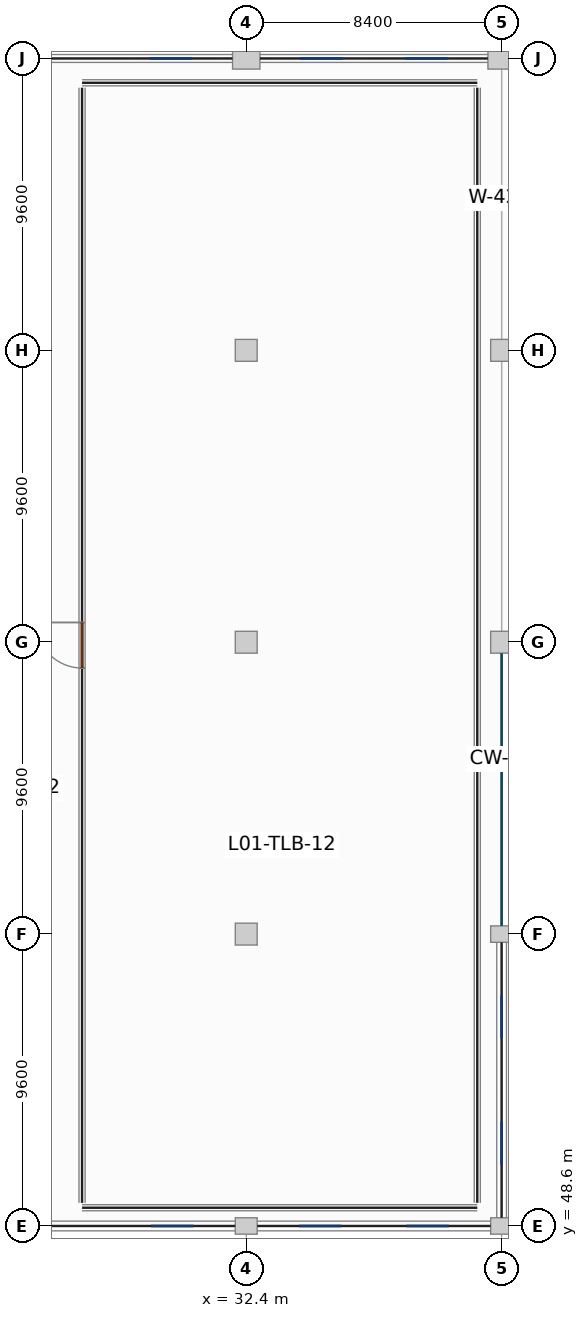
"""IFC4 building model, lengths in metres.
Left out: names, types, materials, properties, quantities, classifications, styles, units other than length and angle.
Written with IfcOpenShell. Run it as: python <this file> out.ifc"""

import sys

from ifc_helpers import new_model, si_unit, direction, frame, frame_2d, origin, origin_2d, place, context, subcontext, project, spatial, rectangle, extrude, element, fill, save


model = new_model("IFC4")
c1 = context("Model", 3, precision=1e-05, world=origin(), true_north=direction((0.0, 1.0)))
c2 = subcontext(c1, "Body", "Model", "MODEL_VIEW")
j1 = project(units=[si_unit("LENGTHUNIT", "METRE"), si_unit("PLANEANGLEUNIT", "RADIAN")], contexts=[c1])
p1 = place(None, origin())
s1 = spatial("IfcSite", under=j1, at=p1, CompositionType="ELEMENT")
p2 = place(p1, origin())
s2 = spatial("IfcBuilding", under=s1, at=p2, CompositionType="ELEMENT")
p3 = place(p2, frame((0.0, 0.0, 5.4)))
s3 = spatial("IfcBuildingStorey", under=s2, at=p3, CompositionType="ELEMENT", Elevation=5.4)
p4 = place(p3, frame((32.4, 48.6, 0.0), z_axis=(0.0, 0.0, 1.0), x_axis=(1.0, 0.0, 0.0)))
e1 = element("IfcColumn", 1, at=p4, inside=s3, PredefinedType="COLUMN", context=c2, shape_type="SweptSolid", body=[
    extrude(rectangle(XDim=0.72, YDim=0.54, at=origin_2d()), origin(), (0.0, 0.0, 1.0), 4.18),
])
for number, where, z_axis, x_axis in (
    (2, (32.4, 58.2, 0.0), (0.0, 0.0, 1.0), (1.0, 0.0, 0.0)),
    (3, (32.4, 67.8, 0.0), (0.0, 0.0, 1.0), (1.0, 0.0, 0.0)),
    (4, (32.4, 77.4, 0.0), (0.0, 0.0, 1.0), (1.0, 0.0, 0.0)),
):
    element("IfcColumn", number, at=place(p3, frame(where, z_axis=z_axis, x_axis=x_axis)), inside=s3, PredefinedType="COLUMN", context=c2, shape_type="SweptSolid", body=[
        extrude(rectangle(XDim=0.72, YDim=0.72, at=origin_2d()), origin(), (0.0, 0.0, 1.0), 4.18),
    ])
p5 = place(p3, frame((32.4, 87.0, 0.0), z_axis=(0.0, 0.0, 1.0), x_axis=(1.0, 0.0, 0.0)))
e5 = element("IfcColumn", 5, at=p5, inside=s3, PredefinedType="COLUMN", context=c2, shape_type="SweptSolid", body=[
    extrude(rectangle(XDim=0.9, YDim=0.7, at=origin_2d()), origin(), (0.0, 0.0, 1.0), 4.18),
])
for number, where, z_axis, x_axis in (
    (6, (40.8, 48.6, 0.0), (0.0, 0.0, 1.0), (1.0, 0.0, 0.0)),
    (7, (40.8, 58.2, 0.0), (0.0, 0.0, 1.0), (1.0, 0.0, 0.0)),
):
    element("IfcColumn", number, at=place(p3, frame(where, z_axis=z_axis, x_axis=x_axis)), inside=s3, PredefinedType="COLUMN", context=c2, shape_type="SweptSolid", body=[
        extrude(rectangle(XDim=0.72, YDim=0.54, at=origin_2d()), origin(), (0.0, 0.0, 1.0), 4.18),
    ])
for number, where, z_axis, x_axis in (
    (8, (40.8, 67.8, 0.0), (0.0, 0.0, 1.0), (1.0, 0.0, 0.0)),
    (9, (40.8, 77.4, 0.0), (0.0, 0.0, 1.0), (1.0, 0.0, 0.0)),
):
    element("IfcColumn", number, at=place(p3, frame(where, z_axis=z_axis, x_axis=x_axis)), inside=s3, PredefinedType="COLUMN", context=c2, shape_type="SweptSolid", body=[
        extrude(rectangle(XDim=0.72, YDim=0.72, at=origin_2d()), origin(), (0.0, 0.0, 1.0), 4.18),
    ])
p6 = place(p3, frame((40.8, 87.0, 0.0), z_axis=(0.0, 0.0, 1.0), x_axis=(1.0, 0.0, 0.0)))
e10 = element("IfcColumn", 10, at=p6, inside=s3, PredefinedType="COLUMN", context=c2, shape_type="SweptSolid", body=[
    extrude(rectangle(XDim=0.9, YDim=0.7, at=origin_2d()), origin(), (0.0, 0.0, 1.0), 4.18),
])
p7 = place(p3, frame((40.8, 48.872, 0.0), z_axis=(0.0, 0.0, 1.0), x_axis=(0.0, 1.0, 0.0)))
e11 = element("IfcWall", 11, at=p7, inside=s3, PredefinedType="SOLIDWALL", context=c2, shape_type="SweptSolid", body=[
    extrude(rectangle(XDim=9.056, YDim=0.32, at=frame_2d((4.528, 0.0))), origin(), (0.0, 0.0, 1.0), 3.38),
])
p8 = place(p7, frame((1.745, 0.0, 0.85)))
e12 = element("IfcOpeningElement", 12, at=p8, cuts=e11, PredefinedType="OPENING", context=c2, shape_type="SweptSolid", body=[
    extrude(rectangle(XDim=1.4, YDim=1.65, at=frame_2d((0.7, 0.825))), frame((0.0, 0.17, 0.0), z_axis=(0.0, -1.0, 0.0), x_axis=(1.0, 0.0, 0.0)), (0.0, 0.0, 1.0), 0.34),
])
p9 = place(p7, frame((5.911, 0.0, 0.85)))
e13 = element("IfcOpeningElement", 13, at=p9, cuts=e11, PredefinedType="OPENING", context=c2, shape_type="SweptSolid", body=[
    extrude(rectangle(XDim=1.4, YDim=1.65, at=frame_2d((0.7, 0.825))), frame((0.0, 0.17, 0.0), z_axis=(0.0, -1.0, 0.0), x_axis=(1.0, 0.0, 0.0)), (0.0, 0.0, 1.0), 0.34),
])
p10 = place(p3, frame((24.362, 48.6, 0.0), z_axis=(0.0, 0.0, 1.0), x_axis=(1.0, 0.0, 0.0)))
e14 = element("IfcWall", 14, at=p10, inside=s3, PredefinedType="SOLIDWALL", context=c2, shape_type="SweptSolid", body=[
    extrude(rectangle(XDim=7.676, YDim=0.32, at=frame_2d((3.838, 0.0))), origin(), (0.0, 0.0, 1.0), 3.38),
])
p11 = place(p10, frame((4.904, 0.0, 0.85)))
e15 = element("IfcOpeningElement", 15, at=p11, cuts=e14, PredefinedType="OPENING", context=c2, shape_type="SweptSolid", body=[
    extrude(rectangle(XDim=1.4, YDim=1.65, at=frame_2d((0.7, 0.825))), frame((0.0, 0.17, 0.0), z_axis=(0.0, -1.0, 0.0), x_axis=(1.0, 0.0, 0.0)), (0.0, 0.0, 1.0), 0.34),
])
p12 = place(p3, frame((32.762, 48.6, 0.0), z_axis=(0.0, 0.0, 1.0), x_axis=(1.0, 0.0, 0.0)))
e16 = element("IfcWall", 16, at=p12, inside=s3, PredefinedType="SOLIDWALL", context=c2, shape_type="SweptSolid", body=[
    extrude(rectangle(XDim=7.676, YDim=0.32, at=frame_2d((3.838, 0.0))), origin(), (0.0, 0.0, 1.0), 3.38),
])
p13 = place(p12, frame((1.373, 0.0, 0.85)))
e17 = element("IfcOpeningElement", 17, at=p13, cuts=e16, PredefinedType="OPENING", context=c2, shape_type="SweptSolid", body=[
    extrude(rectangle(XDim=1.4, YDim=1.65, at=frame_2d((0.7, 0.825))), frame((0.0, 0.17, 0.0), z_axis=(0.0, -1.0, 0.0), x_axis=(1.0, 0.0, 0.0)), (0.0, 0.0, 1.0), 0.34),
])
p14 = place(p12, frame((4.904, 0.0, 0.85)))
e18 = element("IfcOpeningElement", 18, at=p14, cuts=e16, PredefinedType="OPENING", context=c2, shape_type="SweptSolid", body=[
    extrude(rectangle(XDim=1.4, YDim=1.65, at=frame_2d((0.7, 0.825))), frame((0.0, 0.17, 0.0), z_axis=(0.0, -1.0, 0.0), x_axis=(1.0, 0.0, 0.0)), (0.0, 0.0, 1.0), 0.34),
])
p15 = place(p3, frame((24.452, 87.0, 0.0), z_axis=(0.0, 0.0, 1.0), x_axis=(1.0, 0.0, 0.0)))
e19 = element("IfcWall", 19, at=p15, inside=s3, PredefinedType="SOLIDWALL", context=c2, shape_type="SweptSolid", body=[
    extrude(rectangle(XDim=7.496, YDim=0.26, at=frame_2d((3.748, 0.0))), origin(), (0.0, 0.0, 1.0), 3.38),
])
p16 = place(p15, frame((4.772, 0.0, 0.85)))
e20 = element("IfcOpeningElement", 20, at=p16, cuts=e19, PredefinedType="OPENING", context=c2, shape_type="SweptSolid", body=[
    extrude(rectangle(XDim=1.4, YDim=1.65, at=frame_2d((0.7, 0.825))), frame((0.0, 0.14, 0.0), z_axis=(0.0, -1.0, 0.0), x_axis=(1.0, 0.0, 0.0)), (0.0, 0.0, 1.0), 0.28),
])
p17 = place(p3, frame((32.852, 87.0, 0.0), z_axis=(0.0, 0.0, 1.0), x_axis=(1.0, 0.0, 0.0)))
e21 = element("IfcWall", 21, at=p17, inside=s3, PredefinedType="SOLIDWALL", context=c2, shape_type="SweptSolid", body=[
    extrude(rectangle(XDim=7.496, YDim=0.26, at=frame_2d((3.748, 0.0))), origin(), (0.0, 0.0, 1.0), 3.38),
])
p18 = place(p17, frame((1.324, 0.0, 0.85)))
e22 = element("IfcOpeningElement", 22, at=p18, cuts=e21, PredefinedType="OPENING", context=c2, shape_type="SweptSolid", body=[
    extrude(rectangle(XDim=1.4, YDim=1.65, at=frame_2d((0.7, 0.825))), frame((0.0, 0.14, 0.0), z_axis=(0.0, -1.0, 0.0), x_axis=(1.0, 0.0, 0.0)), (0.0, 0.0, 1.0), 0.28),
])
p19 = place(p17, frame((4.772, 0.0, 0.85)))
e23 = element("IfcOpeningElement", 23, at=p19, cuts=e21, PredefinedType="OPENING", context=c2, shape_type="SweptSolid", body=[
    extrude(rectangle(XDim=1.4, YDim=1.65, at=frame_2d((0.7, 0.825))), frame((0.0, 0.14, 0.0), z_axis=(0.0, -1.0, 0.0), x_axis=(1.0, 0.0, 0.0)), (0.0, 0.0, 1.0), 0.28),
])
for number, where, z_axis, x_axis in (
    (24, (27.0, 49.2, 0.0), (0.0, 0.0, 1.0), (1.0, 0.0, 0.0)),
    (25, (27.0, 86.2, 0.0), (0.0, 0.0, 1.0), (1.0, 0.0, 0.0)),
):
    element("IfcWall", number, at=place(p3, frame(where, z_axis=z_axis, x_axis=x_axis)), inside=s3, PredefinedType="PARTITIONING", context=c2, shape_type="SweptSolid", body=[
        extrude(rectangle(XDim=13.0, YDim=0.2, at=frame_2d((6.5, 0.0))), origin(), (0.0, 0.0, 1.0), 3.22),
    ])
p20 = place(p3, frame((27.0, 49.36, 0.0), z_axis=(0.0, 0.0, 1.0), x_axis=(0.0, 1.0, 0.0)))
e26 = element("IfcWall", 26, at=p20, inside=s3, PredefinedType="PARTITIONING", context=c2, shape_type="SweptSolid", body=[
    extrude(rectangle(XDim=36.68, YDim=0.2, at=frame_2d((18.34, 0.0))), origin(), (0.0, 0.0, 1.0), 3.22),
])
p21 = place(p20, frame((17.59, 0.0, 0.0)))
e27 = element("IfcOpeningElement", 27, at=p21, cuts=e26, PredefinedType="OPENING", context=c2, shape_type="SweptSolid", body=[
    extrude(rectangle(XDim=1.5, YDim=2.2, at=frame_2d((0.75, 1.1))), frame((0.0, 0.11, 0.0), z_axis=(0.0, -1.0, 0.0), x_axis=(1.0, 0.0, 0.0)), (0.0, 0.0, 1.0), 0.22),
])
p22 = place(p3, frame((40.0, 49.36, 0.0), z_axis=(0.0, 0.0, 1.0), x_axis=(0.0, 1.0, 0.0)))
e28 = element("IfcWall", 28, at=p22, inside=s3, PredefinedType="PARTITIONING", context=c2, shape_type="SweptSolid", body=[
    extrude(rectangle(XDim=36.68, YDim=0.2, at=frame_2d((18.34, 0.0))), origin(), (0.0, 0.0, 1.0), 3.22),
])
p23 = place(p8, origin())
e29 = element("IfcWindow", 29, at=p23, inside=s3, PartitioningType="SINGLE_PANEL", PredefinedType="WINDOW", context=c2, shape_type="SweptSolid", body=[
    extrude(rectangle(XDim=1.4, YDim=1.65, at=frame_2d((0.7, 0.825))), frame((0.0, 0.03, 0.0), z_axis=(0.0, -1.0, 0.0), x_axis=(1.0, 0.0, 0.0)), (0.0, 0.0, 1.0), 0.06),
])
fill(e12, e29)
p24 = place(p9, origin())
e30 = element("IfcWindow", 30, at=p24, inside=s3, PartitioningType="SINGLE_PANEL", PredefinedType="WINDOW", context=c2, shape_type="SweptSolid", body=[
    extrude(rectangle(XDim=1.4, YDim=1.65, at=frame_2d((0.7, 0.825))), frame((0.0, 0.03, 0.0), z_axis=(0.0, -1.0, 0.0), x_axis=(1.0, 0.0, 0.0)), (0.0, 0.0, 1.0), 0.06),
])
fill(e13, e30)
p25 = place(p11, origin())
e31 = element("IfcWindow", 31, at=p25, inside=s3, PartitioningType="SINGLE_PANEL", PredefinedType="WINDOW", context=c2, shape_type="SweptSolid", body=[
    extrude(rectangle(XDim=1.4, YDim=1.65, at=frame_2d((0.7, 0.825))), frame((0.0, 0.03, 0.0), z_axis=(0.0, -1.0, 0.0), x_axis=(1.0, 0.0, 0.0)), (0.0, 0.0, 1.0), 0.06),
])
fill(e15, e31)
p26 = place(p13, origin())
e32 = element("IfcWindow", 32, at=p26, inside=s3, PartitioningType="SINGLE_PANEL", PredefinedType="WINDOW", context=c2, shape_type="SweptSolid", body=[
    extrude(rectangle(XDim=1.4, YDim=1.65, at=frame_2d((0.7, 0.825))), frame((0.0, 0.03, 0.0), z_axis=(0.0, -1.0, 0.0), x_axis=(1.0, 0.0, 0.0)), (0.0, 0.0, 1.0), 0.06),
])
fill(e17, e32)
p27 = place(p14, origin())
e33 = element("IfcWindow", 33, at=p27, inside=s3, PartitioningType="SINGLE_PANEL", PredefinedType="WINDOW", context=c2, shape_type="SweptSolid", body=[
    extrude(rectangle(XDim=1.4, YDim=1.65, at=frame_2d((0.7, 0.825))), frame((0.0, 0.03, 0.0), z_axis=(0.0, -1.0, 0.0), x_axis=(1.0, 0.0, 0.0)), (0.0, 0.0, 1.0), 0.06),
])
fill(e18, e33)
p28 = place(p16, origin())
e34 = element("IfcWindow", 34, at=p28, inside=s3, PartitioningType="SINGLE_PANEL", PredefinedType="WINDOW", context=c2, shape_type="SweptSolid", body=[
    extrude(rectangle(XDim=1.4, YDim=1.65, at=frame_2d((0.7, 0.825))), frame((0.0, 0.03, 0.0), z_axis=(0.0, -1.0, 0.0), x_axis=(1.0, 0.0, 0.0)), (0.0, 0.0, 1.0), 0.06),
])
fill(e20, e34)
p29 = place(p18, origin())
e35 = element("IfcWindow", 35, at=p29, inside=s3, PartitioningType="SINGLE_PANEL", PredefinedType="WINDOW", context=c2, shape_type="SweptSolid", body=[
    extrude(rectangle(XDim=1.4, YDim=1.65, at=frame_2d((0.7, 0.825))), frame((0.0, 0.03, 0.0), z_axis=(0.0, -1.0, 0.0), x_axis=(1.0, 0.0, 0.0)), (0.0, 0.0, 1.0), 0.06),
])
fill(e22, e35)
p30 = place(p19, origin())
e36 = element("IfcWindow", 36, at=p30, inside=s3, PartitioningType="SINGLE_PANEL", PredefinedType="WINDOW", context=c2, shape_type="SweptSolid", body=[
    extrude(rectangle(XDim=1.4, YDim=1.65, at=frame_2d((0.7, 0.825))), frame((0.0, 0.03, 0.0), z_axis=(0.0, -1.0, 0.0), x_axis=(1.0, 0.0, 0.0)), (0.0, 0.0, 1.0), 0.06),
])
fill(e23, e36)
p31 = place(p21, origin())
e37 = element("IfcDoor", 37, at=p31, inside=s3, OperationType="SINGLE_SWING_RIGHT", PredefinedType="DOOR", context=c2, shape_type="SweptSolid", body=[
    extrude(rectangle(XDim=1.5, YDim=2.2, at=frame_2d((0.75, 1.1))), frame((0.0, 0.025, 0.0), z_axis=(0.0, -1.0, 0.0), x_axis=(1.0, 0.0, 0.0)), (0.0, 0.0, 1.0), 0.05),
])
fill(e27, e37)
save(model, sys.argv[1])
